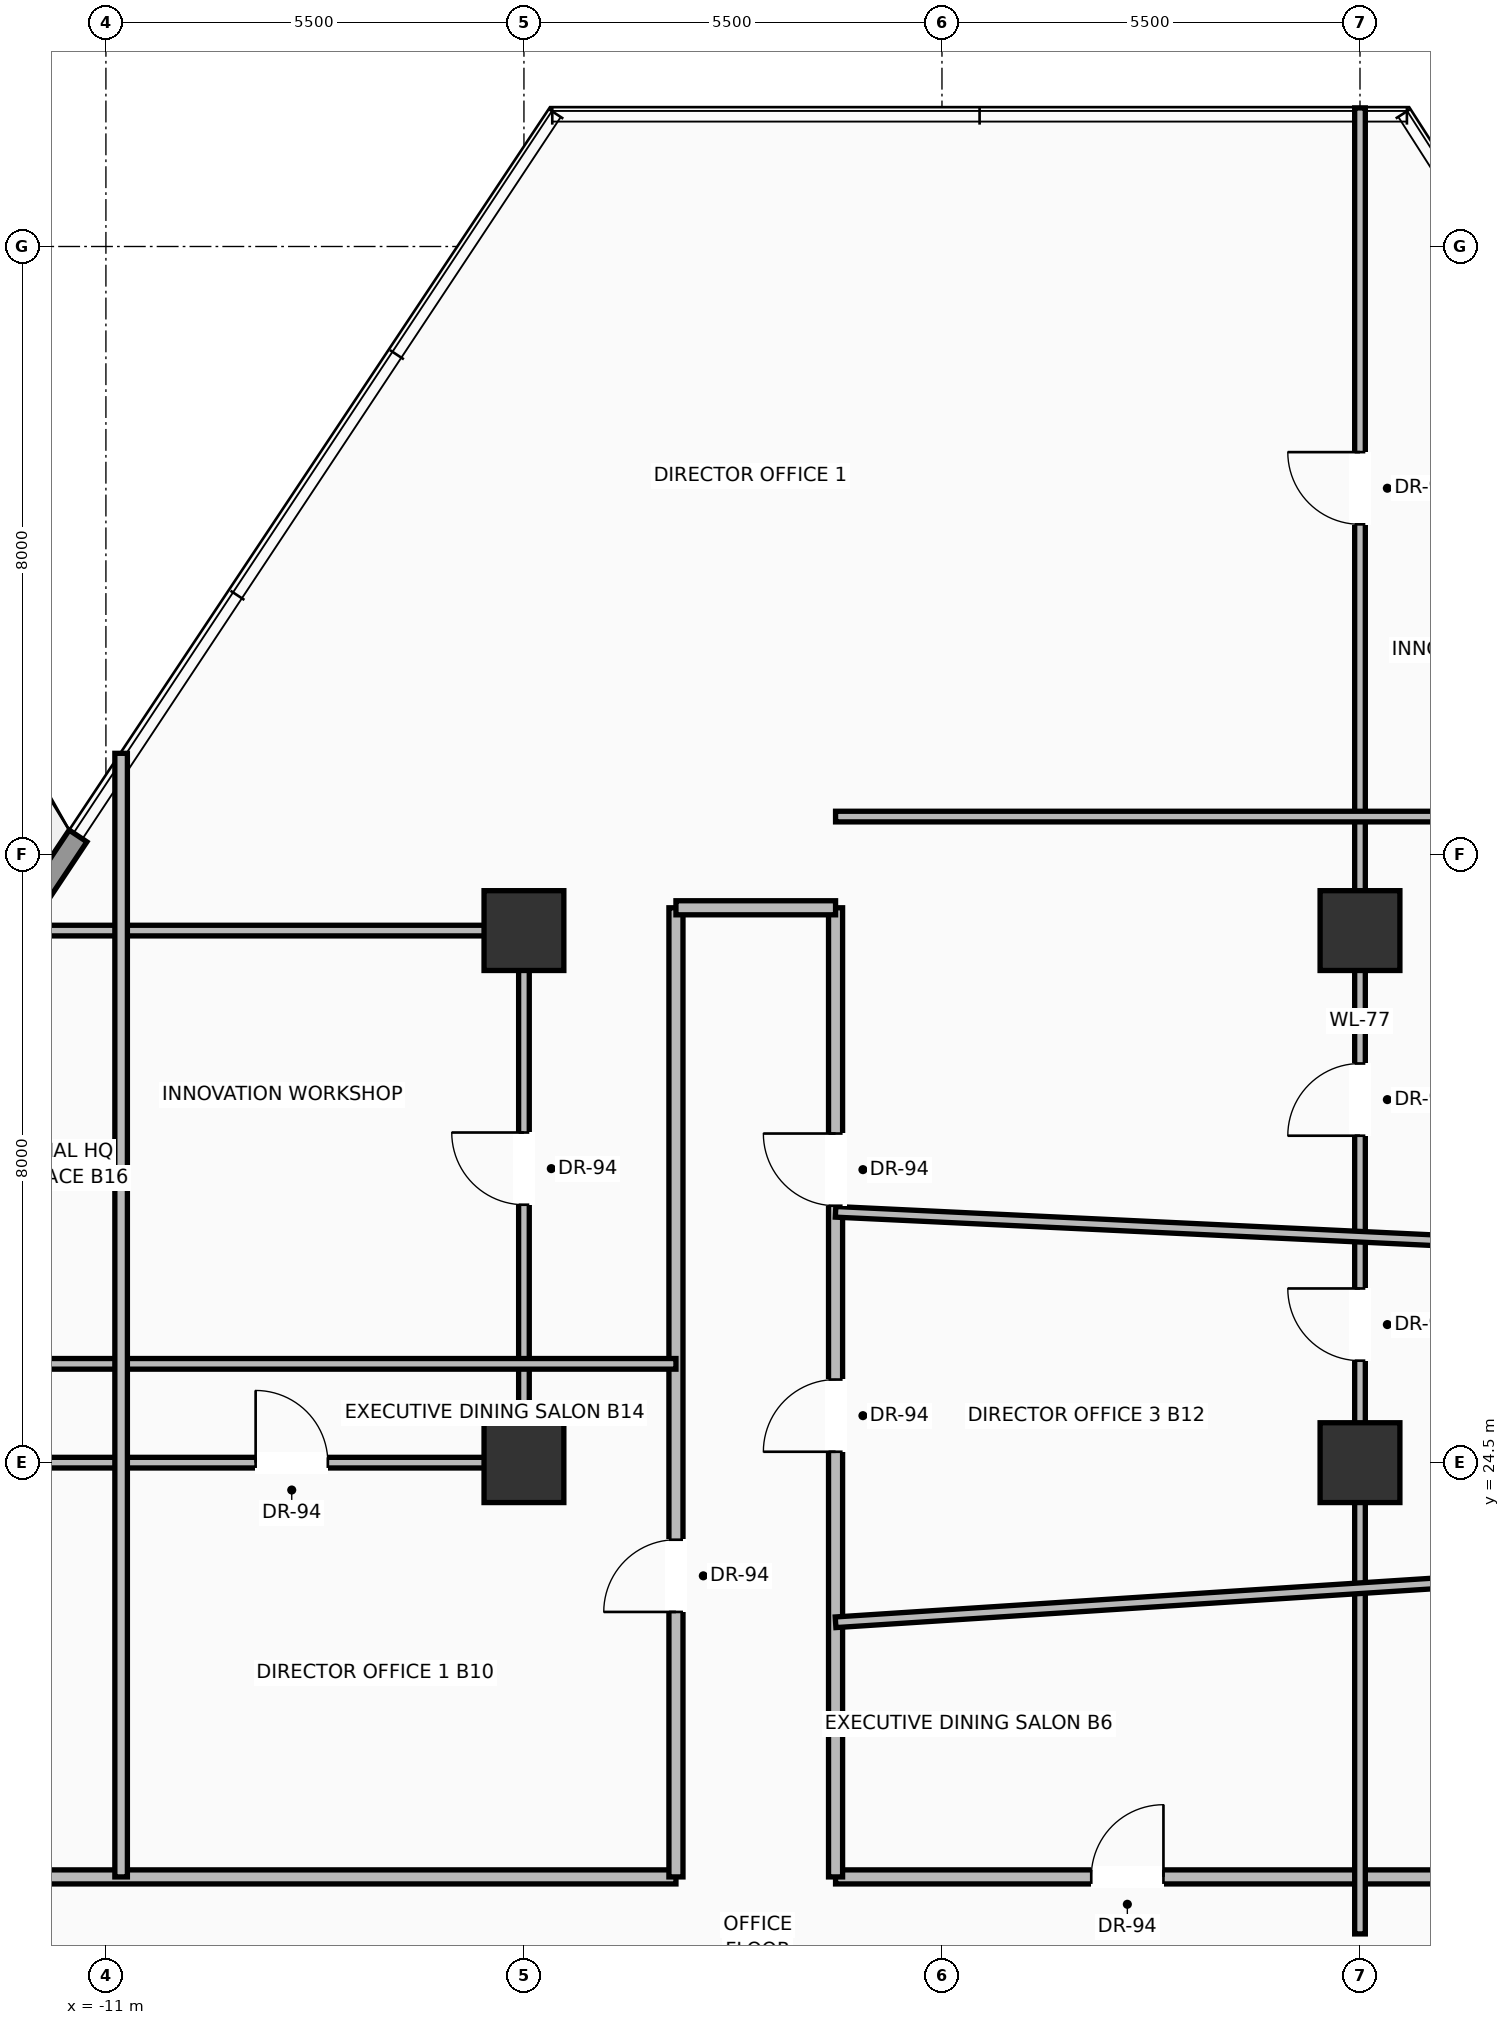
"""IFC4 building model, lengths in metres.
Left out: names, types, materials, properties, quantities, classifications, styles, units other than length and angle.
Written with IfcOpenShell. Run it as: python <this file> out.ifc"""

import sys

from ifc_helpers import new_model, si_unit, direction, frame, frame_2d, origin, origin_2d, place, context, subcontext, project, spatial, rectangle, extrude, source, transform, mapped, element, fill, save


model = new_model("IFC4")
c1 = context("Model", 3, precision=1e-05, world=origin(), true_north=direction((0.0, 1.0)))
c2 = subcontext(c1, "Body", "Model", "MODEL_VIEW")
j1 = project(units=[si_unit("LENGTHUNIT", "METRE"), si_unit("PLANEANGLEUNIT", "RADIAN")], contexts=[c1])
p1 = place(None, origin())
s1 = spatial("IfcSite", under=j1, at=p1, CompositionType="ELEMENT")
p2 = place(p1, origin())
s2 = spatial("IfcBuilding", under=s1, at=p2, CompositionType="ELEMENT")
p3 = place(p2, frame((0.0, 0.0, 113.6)))
s3 = spatial("IfcBuildingStorey", under=s2, at=p3, CompositionType="ELEMENT", Elevation=113.6)
m1 = source(origin(), c2, "Body", "SweptSolid", [
    extrude(rectangle(XDim=1.05, YDim=1.05, at=origin_2d()), origin(), (0.0, 0.0, 1.0), 3.7),
])
for number, where, z_axis, x_axis in (
    (1, (-5.5, 24.5, 0.0), (0.0, 0.0, 1.0), (1.0, 0.0, 0.0)),
    (2, (5.5, 24.5, 0.0), (0.0, 0.0, 1.0), (1.0, 0.0, 0.0)),
    (3, (-5.5, 31.5, 0.0), (0.0, 0.0, 1.0), (1.0, 0.0, 0.0)),
    (4, (5.5, 31.5, 0.0), (0.0, 0.0, 1.0), (1.0, 0.0, 0.0)),
):
    element("IfcColumn", number, at=place(p3, frame(where, z_axis=z_axis, x_axis=x_axis)), inside=s3, PredefinedType="COLUMN", context=c2, shape_type="MappedRepresentation", body=[
        mapped(m1, transform((0.0, 0.0, 0.0), scale=1.0)),
    ])
p4 = place(p3, frame((-21.309, 17.799, 0.0), z_axis=(0.0, 0.0, 1.0), x_axis=(0.553849316162, 0.83261691971, 0.0)))
e5 = element("IfcWall", 5, at=p4, inside=s3, PredefinedType="SOLIDWALL", context=c2, shape_type="SweptSolid", body=[
    extrude(rectangle(XDim=17.95, YDim=0.28, at=frame_2d((8.975, 0.0))), origin(), (0.0, 0.0, 1.0), 3.03),
])
p5 = place(p4, frame((4.308, 0.0, 0.0)))
e6 = element("IfcOpeningElement", 6, at=p5, cuts=e5, PredefinedType="OPENING", context=c2, shape_type="SweptSolid", body=[
    extrude(rectangle(XDim=1.6, YDim=2.35, at=frame_2d((0.8, 1.175))), frame((0.0, 0.15, 0.0), z_axis=(0.0, -1.0, 0.0), x_axis=(1.0, 0.0, 0.0)), (0.0, 0.0, 1.0), 0.3),
])
p6 = place(p4, frame((12.206, 0.0, 0.9)))
e7 = element("IfcOpeningElement", 7, at=p6, cuts=e5, PredefinedType="OPENING", context=c2, shape_type="SweptSolid", body=[
    extrude(rectangle(XDim=2.0, YDim=1.85, at=frame_2d((1.0, 0.925))), frame((0.0, 0.15, 0.0), z_axis=(0.0, -1.0, 0.0), x_axis=(1.0, 0.0, 0.0)), (0.0, 0.0, 1.0), 0.3),
])
p7 = place(p3, frame((-20.633, 19.05, 0.0), z_axis=(0.0, 0.0, 1.0), x_axis=(1.0, 0.0, 0.0)))
e8 = element("IfcWall", 8, at=p7, inside=s3, PredefinedType="PARTITIONING", context=c2, shape_type="SweptSolid", body=[
    extrude(rectangle(XDim=17.133, YDim=0.185, at=frame_2d((8.566, 0.0))), origin(), (0.0, 0.0, 1.0), 2.747),
])
p8 = place(p7, frame((7.269, 0.0, 0.0)))
e9 = element("IfcOpeningElement", 9, at=p8, cuts=e8, PredefinedType="OPENING", context=c2, shape_type="SweptSolid", body=[
    extrude(rectangle(XDim=0.95, YDim=2.2, at=frame_2d((0.475, 1.1))), frame((0.0, 0.103, 0.0), z_axis=(0.0, -1.0, 0.0), x_axis=(1.0, 0.0, 0.0)), (0.0, 0.0, 1.0), 0.205),
])
p9 = place(p3, frame((-1.4, 19.05, 0.0), z_axis=(0.0, 0.0, 1.0), x_axis=(1.0, 0.0, 0.0)))
e10 = element("IfcWall", 10, at=p9, inside=s3, PredefinedType="PARTITIONING", context=c2, shape_type="SweptSolid", body=[
    extrude(rectangle(XDim=22.478, YDim=0.185, at=frame_2d((11.239, 0.0))), origin(), (0.0, 0.0, 1.0), 2.747),
])
p10 = place(p9, frame((12.715, 0.0, 0.0)))
e11 = element("IfcOpeningElement", 11, at=p10, cuts=e10, PredefinedType="OPENING", context=c2, shape_type="SweptSolid", body=[
    extrude(rectangle(XDim=0.95, YDim=2.2, at=frame_2d((0.475, 1.1))), frame((0.0, 0.103, 0.0), z_axis=(0.0, -1.0, 0.0), x_axis=(1.0, 0.0, 0.0)), (0.0, 0.0, 1.0), 0.205),
])
p11 = place(p9, frame((3.364, 0.0, 0.0)))
e12 = element("IfcOpeningElement", 12, at=p11, cuts=e10, PredefinedType="OPENING", context=c2, shape_type="SweptSolid", body=[
    extrude(rectangle(XDim=0.95, YDim=2.2, at=frame_2d((0.475, 1.1))), frame((0.0, 0.103, 0.0), z_axis=(0.0, -1.0, 0.0), x_axis=(1.0, 0.0, 0.0)), (0.0, 0.0, 1.0), 0.205),
])
p12 = place(p9, frame((9.023, 0.0, 0.0)))
e13 = element("IfcOpeningElement", 13, at=p12, cuts=e10, PredefinedType="OPENING", context=c2, shape_type="SweptSolid", body=[
    extrude(rectangle(XDim=0.95, YDim=2.2, at=frame_2d((0.475, 1.1))), frame((0.0, 0.103, 0.0), z_axis=(0.0, -1.0, 0.0), x_axis=(1.0, 0.0, 0.0)), (0.0, 0.0, 1.0), 0.205),
])
p13 = place(p3, frame((-3.5, 19.05, 0.0), z_axis=(0.0, 0.0, 1.0), x_axis=(0.0, 1.0, 0.0)))
e14 = element("IfcWall", 14, at=p13, inside=s3, PredefinedType="PARTITIONING", context=c2, shape_type="SweptSolid", body=[
    extrude(rectangle(XDim=12.75, YDim=0.185, at=frame_2d((6.375, 0.0))), origin(), (0.0, 0.0, 1.0), 2.747),
])
p14 = place(p13, frame((3.486, 0.0, 0.0)))
e15 = element("IfcOpeningElement", 15, at=p14, cuts=e14, PredefinedType="OPENING", context=c2, shape_type="SweptSolid", body=[
    extrude(rectangle(XDim=0.95, YDim=2.2, at=frame_2d((0.475, 1.1))), frame((0.0, 0.103, 0.0), z_axis=(0.0, -1.0, 0.0), x_axis=(1.0, 0.0, 0.0)), (0.0, 0.0, 1.0), 0.205),
])
p15 = place(p3, frame((-1.4, 19.05, 0.0), z_axis=(0.0, 0.0, 1.0), x_axis=(0.0, 1.0, 0.0)))
e16 = element("IfcWall", 16, at=p15, inside=s3, PredefinedType="PARTITIONING", context=c2, shape_type="SweptSolid", body=[
    extrude(rectangle(XDim=12.75, YDim=0.185, at=frame_2d((6.375, 0.0))), origin(), (0.0, 0.0, 1.0), 2.747),
])
p16 = place(p15, frame((8.83, 0.0, 0.0)))
e17 = element("IfcOpeningElement", 17, at=p16, cuts=e16, PredefinedType="OPENING", context=c2, shape_type="SweptSolid", body=[
    extrude(rectangle(XDim=0.95, YDim=2.2, at=frame_2d((0.475, 1.1))), frame((0.0, 0.103, 0.0), z_axis=(0.0, -1.0, 0.0), x_axis=(1.0, 0.0, 0.0)), (0.0, 0.0, 1.0), 0.205),
])
p17 = place(p15, frame((5.593, 0.0, 0.0)))
e18 = element("IfcOpeningElement", 18, at=p17, cuts=e16, PredefinedType="OPENING", context=c2, shape_type="SweptSolid", body=[
    extrude(rectangle(XDim=0.95, YDim=2.2, at=frame_2d((0.475, 1.1))), frame((0.0, 0.103, 0.0), z_axis=(0.0, -1.0, 0.0), x_axis=(1.0, 0.0, 0.0)), (0.0, 0.0, 1.0), 0.205),
])
p18 = place(p3, frame((-3.5, 31.8, 0.0), z_axis=(0.0, 0.0, 1.0), x_axis=(1.0, 0.0, 0.0)))
e19 = element("IfcWall", 19, at=p18, inside=s3, PredefinedType="PARTITIONING", context=c2, shape_type="SweptSolid", body=[
    extrude(rectangle(XDim=2.1, YDim=0.185, at=frame_2d((1.05, 0.0))), origin(), (0.0, 0.0, 1.0), 2.747),
])
p19 = place(p3, frame((5.5, 18.3, 0.0), z_axis=(0.0, 0.0, 1.0), x_axis=(0.0, 1.0, 0.0)))
e20 = element("IfcWall", 20, at=p19, inside=s3, PredefinedType="PARTITIONING", context=c2, shape_type="SweptSolid", body=[
    extrude(rectangle(XDim=24.023, YDim=0.14, at=frame_2d((12.012, 0.0))), origin(), (0.0, 0.0, 1.0), 2.747),
])
p20 = place(p19, frame((10.501, 0.0, 0.0)))
e21 = element("IfcOpeningElement", 21, at=p20, cuts=e20, PredefinedType="OPENING", context=c2, shape_type="SweptSolid", body=[
    extrude(rectangle(XDim=0.95, YDim=2.2, at=frame_2d((0.475, 1.1))), frame((0.0, 0.08, 0.0), z_axis=(0.0, -1.0, 0.0), x_axis=(1.0, 0.0, 0.0)), (0.0, 0.0, 1.0), 0.16),
])
p21 = place(p19, frame((18.545, 0.0, 0.0)))
e22 = element("IfcOpeningElement", 22, at=p21, cuts=e20, PredefinedType="OPENING", context=c2, shape_type="SweptSolid", body=[
    extrude(rectangle(XDim=0.95, YDim=2.2, at=frame_2d((0.475, 1.1))), frame((0.0, 0.08, 0.0), z_axis=(0.0, -1.0, 0.0), x_axis=(1.0, 0.0, 0.0)), (0.0, 0.0, 1.0), 0.16),
])
p22 = place(p19, frame((7.542, 0.0, 0.0)))
e23 = element("IfcOpeningElement", 23, at=p22, cuts=e20, PredefinedType="OPENING", context=c2, shape_type="SweptSolid", body=[
    extrude(rectangle(XDim=0.95, YDim=2.2, at=frame_2d((0.475, 1.1))), frame((0.0, 0.08, 0.0), z_axis=(0.0, -1.0, 0.0), x_axis=(1.0, 0.0, 0.0)), (0.0, 0.0, 1.0), 0.16),
])
p23 = place(p3, frame((-17.008, 24.5, 0.0), z_axis=(0.0, 0.0, 1.0), x_axis=(1.0, 0.0, 0.0)))
e24 = element("IfcWall", 24, at=p23, inside=s3, PredefinedType="PARTITIONING", context=c2, shape_type="SweptSolid", body=[
    extrude(rectangle(XDim=11.508, YDim=0.14, at=frame_2d((5.754, 0.0))), origin(), (0.0, 0.0, 1.0), 2.747),
])
p24 = place(p23, frame((2.92, 0.0, 0.0)))
e25 = element("IfcOpeningElement", 25, at=p24, cuts=e24, PredefinedType="OPENING", context=c2, shape_type="SweptSolid", body=[
    extrude(rectangle(XDim=0.95, YDim=2.2, at=frame_2d((0.475, 1.1))), frame((0.0, 0.08, 0.0), z_axis=(0.0, -1.0, 0.0), x_axis=(1.0, 0.0, 0.0)), (0.0, 0.0, 1.0), 0.16),
])
p25 = place(p23, frame((7.977, 0.0, 0.0)))
e26 = element("IfcOpeningElement", 26, at=p25, cuts=e24, PredefinedType="OPENING", context=c2, shape_type="SweptSolid", body=[
    extrude(rectangle(XDim=0.95, YDim=2.2, at=frame_2d((0.475, 1.1))), frame((0.0, 0.08, 0.0), z_axis=(0.0, -1.0, 0.0), x_axis=(1.0, 0.0, 0.0)), (0.0, 0.0, 1.0), 0.16),
])
p26 = place(p3, frame((-5.5, 24.5, 0.0), z_axis=(0.0, 0.0, 1.0), x_axis=(0.0, 1.0, 0.0)))
e27 = element("IfcWall", 27, at=p26, inside=s3, PredefinedType="PARTITIONING", context=c2, shape_type="SweptSolid", body=[
    extrude(rectangle(XDim=7.0, YDim=0.14, at=frame_2d((3.5, 0.0))), origin(), (0.0, 0.0, 1.0), 2.747),
])
p27 = place(p26, frame((3.393, 0.0, 0.0)))
e28 = element("IfcOpeningElement", 28, at=p27, cuts=e27, PredefinedType="OPENING", context=c2, shape_type="SweptSolid", body=[
    extrude(rectangle(XDim=0.95, YDim=2.2, at=frame_2d((0.475, 1.1))), frame((0.0, 0.08, 0.0), z_axis=(0.0, -1.0, 0.0), x_axis=(1.0, 0.0, 0.0)), (0.0, 0.0, 1.0), 0.16),
])
p28 = place(p3, frame((-12.351, 31.5, 0.0), z_axis=(0.0, 0.0, 1.0), x_axis=(1.0, 0.0, 0.0)))
e29 = element("IfcWall", 29, at=p28, inside=s3, PredefinedType="PARTITIONING", context=c2, shape_type="SweptSolid", body=[
    extrude(rectangle(XDim=6.851, YDim=0.14, at=frame_2d((3.426, 0.0))), origin(), (0.0, 0.0, 1.0), 2.747),
])
p29 = place(p3, frame((-16.143, 25.8, 0.0), z_axis=(0.0, 0.0, 1.0), x_axis=(1.0, 0.0, 0.0)))
e30 = element("IfcWall", 30, at=p29, inside=s3, PredefinedType="PARTITIONING", context=c2, shape_type="SweptSolid", body=[
    extrude(rectangle(XDim=12.643, YDim=0.14, at=frame_2d((6.321, 0.0))), origin(), (0.0, 0.0, 1.0), 2.747),
])
p30 = place(p29, frame((2.528, 0.0, 0.0)))
e31 = element("IfcOpeningElement", 31, at=p30, cuts=e30, PredefinedType="OPENING", context=c2, shape_type="SweptSolid", body=[
    extrude(rectangle(XDim=0.95, YDim=2.2, at=frame_2d((0.475, 1.1))), frame((0.0, 0.08, 0.0), z_axis=(0.0, -1.0, 0.0), x_axis=(1.0, 0.0, 0.0)), (0.0, 0.0, 1.0), 0.16),
])
p31 = place(p3, frame((-1.4, 22.4, 0.0), z_axis=(0.0, 0.0, 1.0), x_axis=(0.99789792226, 0.064805375933, 0.0)))
e32 = element("IfcWall", 32, at=p31, inside=s3, PredefinedType="PARTITIONING", context=c2, shape_type="SweptSolid", body=[
    extrude(rectangle(XDim=19.556, YDim=0.14, at=frame_2d((9.778, 0.0))), origin(), (0.0, 0.0, 1.0), 2.747),
])
p32 = place(p31, frame((14.982, 0.0, 0.0)))
e33 = element("IfcOpeningElement", 33, at=p32, cuts=e32, PredefinedType="OPENING", context=c2, shape_type="SweptSolid", body=[
    extrude(rectangle(XDim=0.95, YDim=2.2, at=frame_2d((0.475, 1.1))), frame((0.0, 0.08, 0.0), z_axis=(0.0, -1.0, 0.0), x_axis=(1.0, 0.0, 0.0)), (0.0, 0.0, 1.0), 0.16),
])
p33 = place(p3, frame((-1.4, 27.8, 0.0), z_axis=(0.0, 0.0, 1.0), x_axis=(0.998874409944, -0.047433249517, 0.0)))
e34 = element("IfcWall", 34, at=p33, inside=s3, PredefinedType="PARTITIONING", context=c2, shape_type="SweptSolid", body=[
    extrude(rectangle(XDim=17.412, YDim=0.14, at=frame_2d((8.706, 0.0))), origin(), (0.0, 0.0, 1.0), 2.747),
])
p34 = place(p33, frame((13.859, 0.0, 0.0)))
e35 = element("IfcOpeningElement", 35, at=p34, cuts=e34, PredefinedType="OPENING", context=c2, shape_type="SweptSolid", body=[
    extrude(rectangle(XDim=0.95, YDim=2.2, at=frame_2d((0.475, 1.1))), frame((0.0, 0.08, 0.0), z_axis=(0.0, -1.0, 0.0), x_axis=(1.0, 0.0, 0.0)), (0.0, 0.0, 1.0), 0.16),
])
p35 = place(p3, frame((-1.4, 33.0, 0.0), z_axis=(0.0, 0.0, 1.0), x_axis=(1.0, 0.0, 0.0)))
e36 = element("IfcWall", 36, at=p35, inside=s3, PredefinedType="PARTITIONING", context=c2, shape_type="SweptSolid", body=[
    extrude(rectangle(XDim=13.525, YDim=0.14, at=frame_2d((6.763, 0.0))), origin(), (0.0, 0.0, 1.0), 2.747),
])
p36 = place(p3, frame((-10.8, 19.05, 0.0), z_axis=(0.0, 0.0, 1.0), x_axis=(0.0, 1.0, 0.0)))
e37 = element("IfcWall", 37, at=p36, inside=s3, PredefinedType="PARTITIONING", context=c2, shape_type="SweptSolid", body=[
    extrude(rectangle(XDim=14.782, YDim=0.165, at=frame_2d((7.391, 0.0))), origin(), (0.0, 0.0, 1.0), 2.747),
])
m2 = source(origin(), c2, "Body", "SweptSolid", [
    extrude(rectangle(XDim=0.95, YDim=2.2, at=frame_2d((0.475, 1.1))), frame((0.0, 0.025, 0.0), z_axis=(0.0, -1.0, 0.0), x_axis=(1.0, 0.0, 0.0)), (0.0, 0.0, 1.0), 0.05),
])
p37 = place(p14, origin())
e38 = element("IfcDoor", 38, at=p37, inside=s3, OperationType="SINGLE_SWING_LEFT", PredefinedType="DOOR", context=c2, shape_type="MappedRepresentation", body=[
    mapped(m2, transform((0.0, 0.0, 0.0), scale=1.0)),
])
fill(e15, e38)
p38 = place(p16, origin())
e39 = element("IfcDoor", 39, at=p38, inside=s3, OperationType="SINGLE_SWING_RIGHT", PredefinedType="DOOR", context=c2, shape_type="MappedRepresentation", body=[
    mapped(m2, transform((0.0, 0.0, 0.0), scale=1.0)),
])
fill(e17, e39)
p39 = place(p11, origin())
e40 = element("IfcDoor", 40, at=p39, inside=s3, OperationType="SINGLE_SWING_RIGHT", PredefinedType="DOOR", context=c2, shape_type="MappedRepresentation", body=[
    mapped(m2, transform((0.0, 0.0, 0.0), scale=1.0)),
])
fill(e12, e40)
p40 = place(p17, origin())
e41 = element("IfcDoor", 41, at=p40, inside=s3, OperationType="SINGLE_SWING_LEFT", PredefinedType="DOOR", context=c2, shape_type="MappedRepresentation", body=[
    mapped(m2, transform((0.0, 0.0, 0.0), scale=1.0)),
])
fill(e18, e41)
p41 = place(p25, origin())
e42 = element("IfcDoor", 42, at=p41, inside=s3, OperationType="SINGLE_SWING_LEFT", PredefinedType="DOOR", context=c2, shape_type="MappedRepresentation", body=[
    mapped(m2, transform((0.0, 0.0, 0.0), scale=1.0)),
])
fill(e26, e42)
p42 = place(p27, origin())
e43 = element("IfcDoor", 43, at=p42, inside=s3, OperationType="SINGLE_SWING_RIGHT", PredefinedType="DOOR", context=c2, shape_type="MappedRepresentation", body=[
    mapped(m2, transform((0.0, 0.0, 0.0), scale=1.0)),
])
fill(e28, e43)
p43 = place(p20, origin())
e44 = element("IfcDoor", 44, at=p43, inside=s3, OperationType="SINGLE_SWING_LEFT", PredefinedType="DOOR", context=c2, shape_type="MappedRepresentation", body=[
    mapped(m2, transform((0.0, 0.0, 0.0), scale=1.0)),
])
fill(e21, e44)
p44 = place(p21, origin())
e45 = element("IfcDoor", 45, at=p44, inside=s3, OperationType="SINGLE_SWING_RIGHT", PredefinedType="DOOR", context=c2, shape_type="MappedRepresentation", body=[
    mapped(m2, transform((0.0, 0.0, 0.0), scale=1.0)),
])
fill(e22, e45)
p45 = place(p22, origin())
e46 = element("IfcDoor", 46, at=p45, inside=s3, OperationType="SINGLE_SWING_RIGHT", PredefinedType="DOOR", context=c2, shape_type="MappedRepresentation", body=[
    mapped(m2, transform((0.0, 0.0, 0.0), scale=1.0)),
])
fill(e23, e46)
save(model, sys.argv[1])
